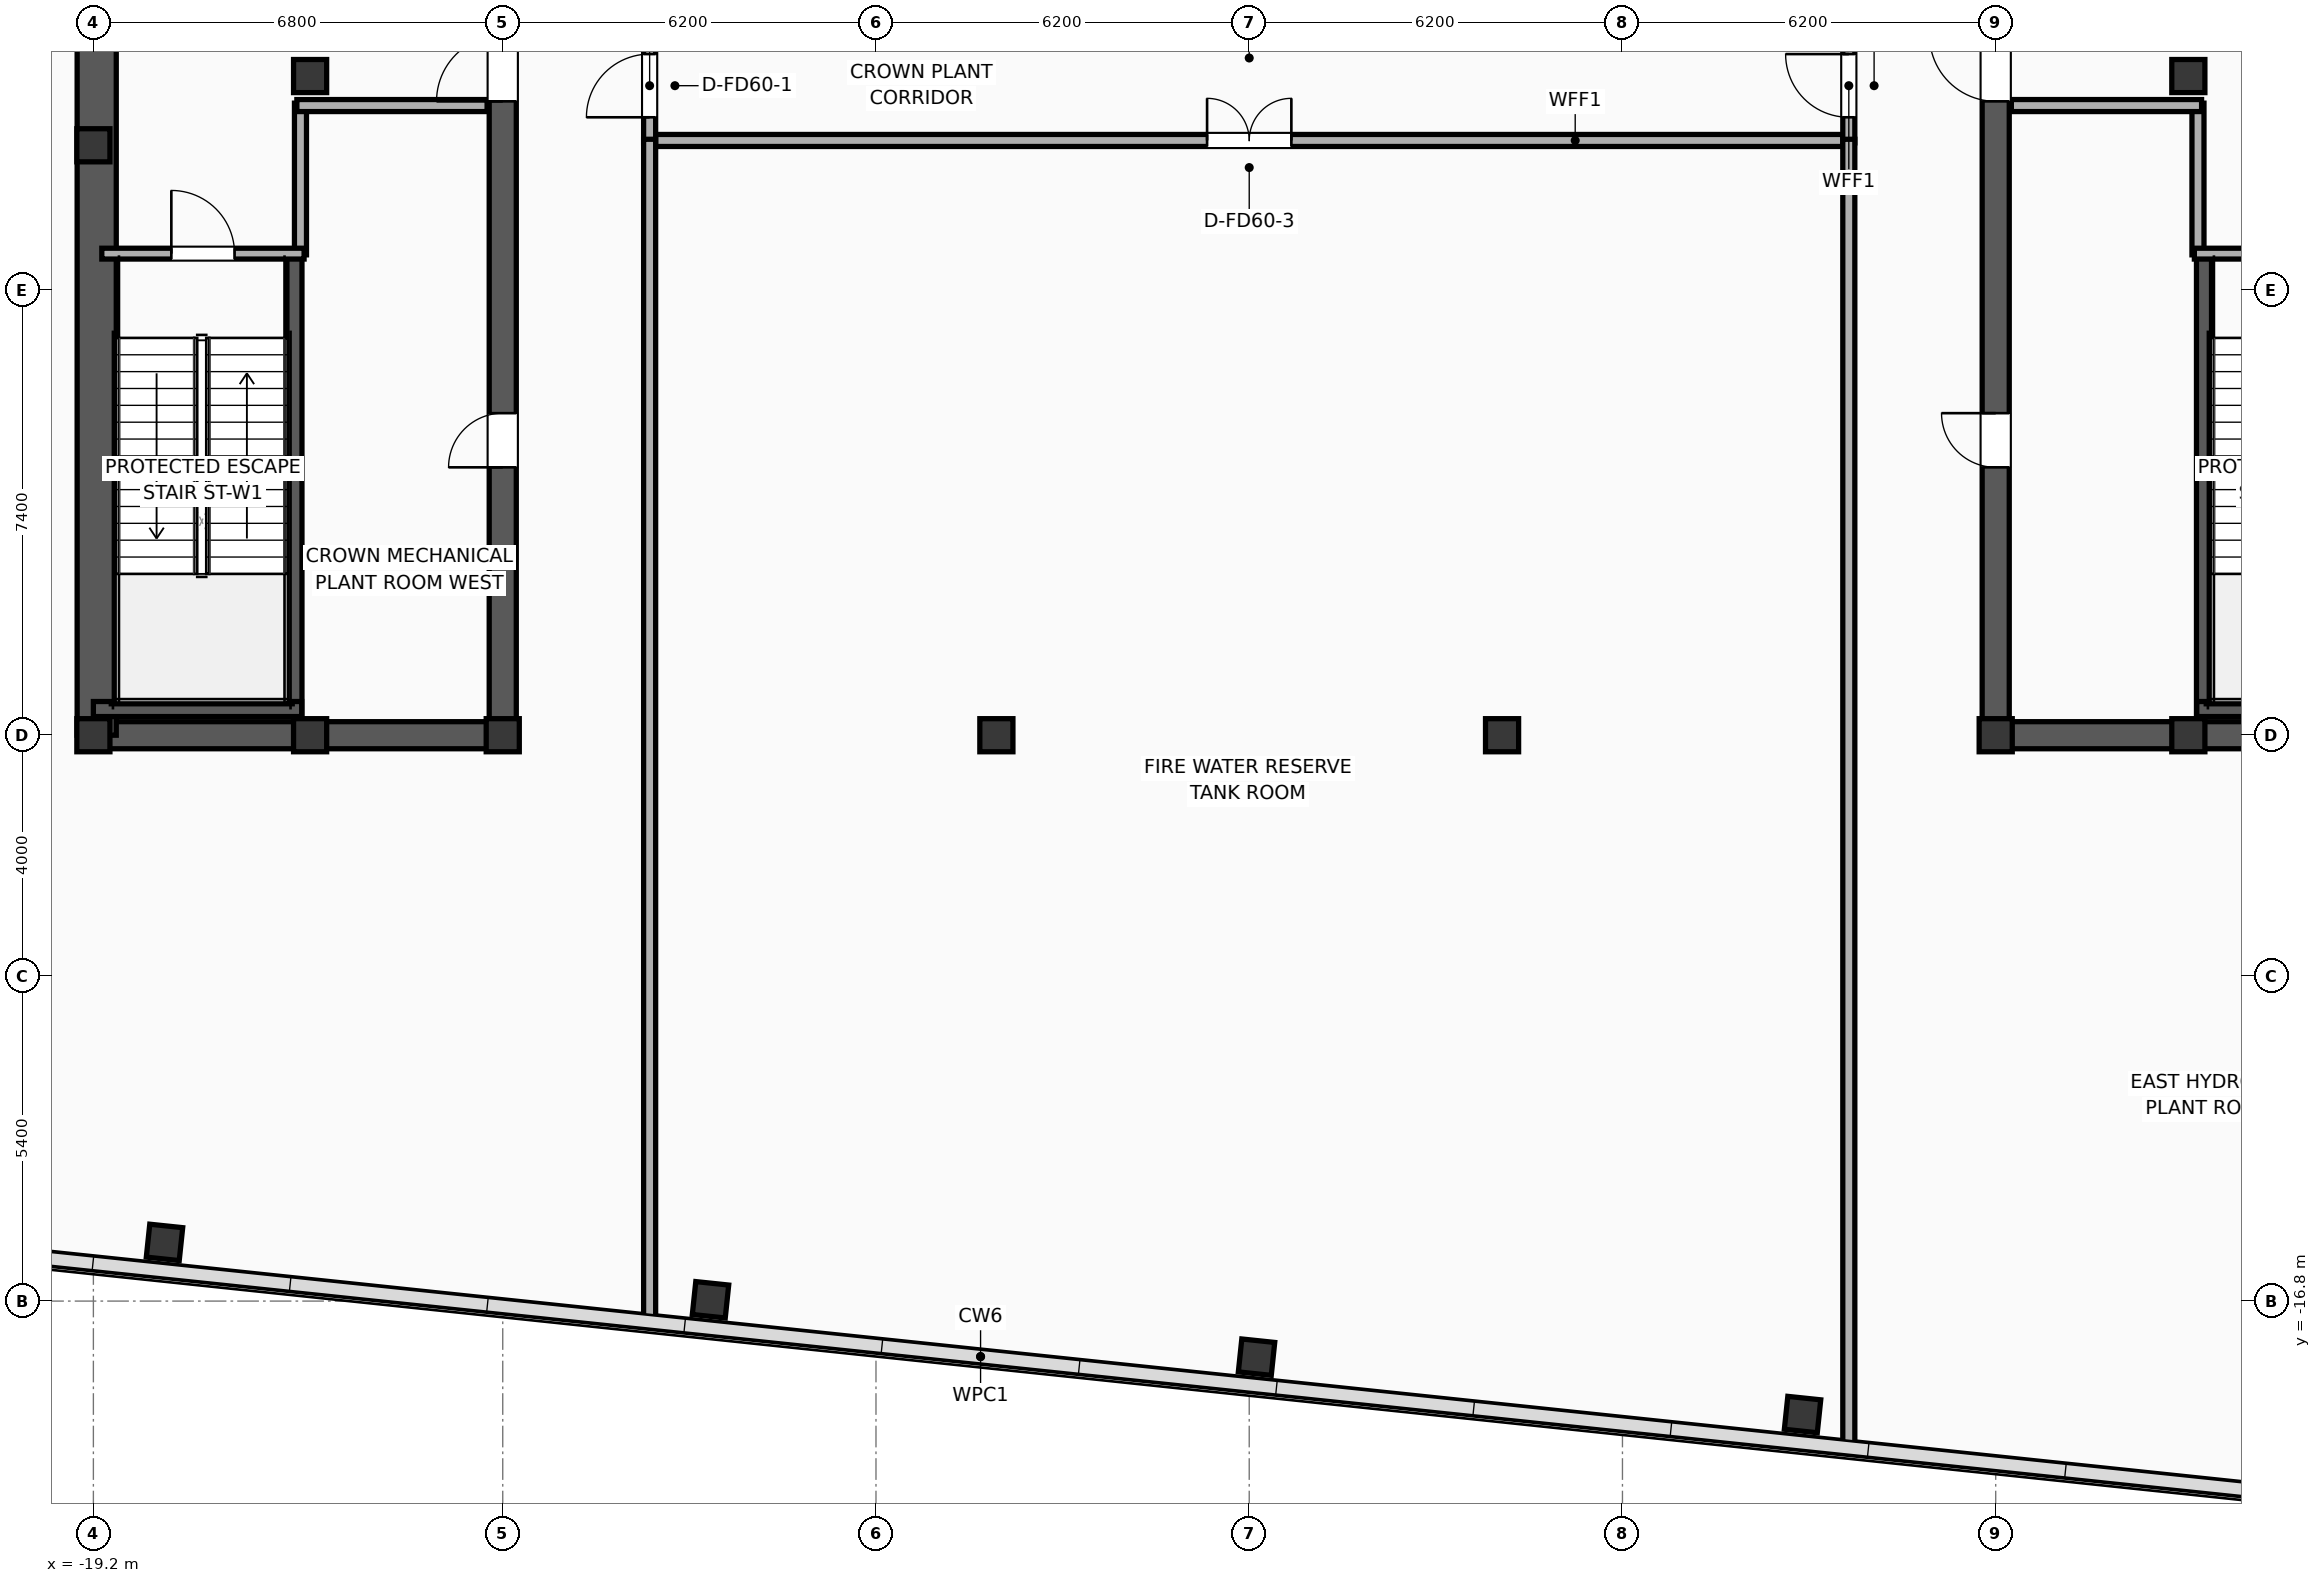
"""IFC4 building model, lengths in metres.
Left out: names, types, materials, properties, quantities, classifications, styles, units other than length and angle.
Written with IfcOpenShell. Run it as: python <this file> out.ifc"""

import sys

from ifc_helpers import new_model, si_unit, direction, frame, frame_2d, origin, origin_2d, place, context, subcontext, project, spatial, rectangle, hollow_rectangle, extrude, element, fill, save


model = new_model("IFC4")
c1 = context("Model", 3, precision=1e-05, world=origin(), true_north=direction((0.0, 1.0)))
c2 = subcontext(c1, "Body", "Model", "MODEL_VIEW")
j1 = project(units=[si_unit("LENGTHUNIT", "METRE"), si_unit("PLANEANGLEUNIT", "RADIAN")], contexts=[c1])
p1 = place(None, origin())
s1 = spatial("IfcSite", under=j1, at=p1, CompositionType="ELEMENT")
p2 = place(p1, origin())
s2 = spatial("IfcBuilding", under=s1, at=p2, CompositionType="ELEMENT")
p3 = place(p2, frame((0.0, 0.0, 321.3)))
s3 = spatial("IfcBuildingStorey", under=s2, at=p3, CompositionType="ELEMENT", Elevation=321.3)
for number, where, z_axis, x_axis in (
    (1, (-19.2, -7.4, 0.0), (0.0, 0.0, 1.0), (1.0, 0.0, 0.0)),
    (2, (-19.2, 2.4, 0.0), (0.0, 0.0, 1.0), (1.0, 0.0, 0.0)),
    (3, (-15.6, -7.4, 0.0), (0.0, 0.0, 1.0), (1.0, 0.0, 0.0)),
    (4, (-12.4, -7.4, 0.0), (0.0, 0.0, 1.0), (1.0, 0.0, 0.0)),
    (5, (-15.6, 3.55, 0.0), (0.0, 0.0, 1.0), (1.0, 0.0, 0.0)),
    (6, (12.4, -7.4, 0.0), (0.0, 0.0, 1.0), (1.0, 0.0, 0.0)),
    (7, (15.6, 3.55, 0.0), (0.0, 0.0, 1.0), (1.0, 0.0, 0.0)),
    (8, (15.6, -7.4, 0.0), (0.0, 0.0, 1.0), (1.0, 0.0, 0.0)),
):
    element("IfcColumn", number, at=place(p3, frame(where, z_axis=z_axis, x_axis=x_axis)), inside=s3, PredefinedType="COLUMN", context=c2, shape_type="SweptSolid", body=[
        extrude(hollow_rectangle(XDim=0.55, YDim=0.55, WallThickness=0.022, at=origin_2d()), origin(), (0.0, 0.0, 1.0), 5.3),
    ])
p4 = place(p3, frame((-19.425, -7.4, 0.0), z_axis=(0.0, 0.0, 1.0), x_axis=(1.0, 0.0, 0.0)))
e9 = element("IfcWall", 9, at=p4, inside=s3, PredefinedType="SHEAR", context=c2, shape_type="SweptSolid", body=[
    extrude(rectangle(XDim=7.25, YDim=0.45, at=frame_2d((3.625, 0.0))), origin(), (0.0, 0.0, 1.0), 5.025),
])
p5 = place(p3, frame((-19.145, -7.4, 0.0), z_axis=(0.0, 0.0, 1.0), x_axis=(0.0, 1.0, 0.0)))
e10 = element("IfcWall", 10, at=p5, inside=s3, PredefinedType="SHEAR", context=c2, shape_type="SweptSolid", body=[
    extrude(rectangle(XDim=14.8, YDim=0.65, at=frame_2d((7.4, 0.0))), origin(), (0.0, 0.0, 1.0), 5.025),
])
p6 = place(p3, frame((-12.4, -7.4, 0.0), z_axis=(0.0, 0.0, 1.0), x_axis=(0.0, 1.0, 0.0)))
e11 = element("IfcWall", 11, at=p6, inside=s3, PredefinedType="SHEAR", context=c2, shape_type="SweptSolid", body=[
    extrude(rectangle(XDim=14.8, YDim=0.45, at=frame_2d((7.4, 0.0))), origin(), (0.0, 0.0, 1.0), 5.025),
])
p7 = place(p6, frame((10.53, 0.0, 0.0)))
e12 = element("IfcOpeningElement", 12, at=p7, cuts=e11, PredefinedType="OPENING", context=c2, shape_type="SweptSolid", body=[
    extrude(rectangle(XDim=1.1, YDim=2.05, at=frame_2d((0.55, 1.025))), frame((0.0, 0.235, 0.0), z_axis=(0.0, -1.0, 0.0), x_axis=(1.0, 0.0, 0.0)), (0.0, 0.0, 1.0), 0.47),
])
p8 = place(p6, frame((4.45, 0.0, 0.0)))
e13 = element("IfcOpeningElement", 13, at=p8, cuts=e11, PredefinedType="OPENING", context=c2, shape_type="SweptSolid", body=[
    extrude(rectangle(XDim=0.9, YDim=2.05, at=frame_2d((0.45, 1.025))), frame((0.0, 0.235, 0.0), z_axis=(0.0, -1.0, 0.0), x_axis=(1.0, 0.0, 0.0)), (0.0, 0.0, 1.0), 0.47),
])
p9 = place(p3, frame((-15.86, -7.085, 0.0), z_axis=(0.0, 0.0, 1.0), x_axis=(0.0, 1.0, 0.0)))
e14 = element("IfcWall", 14, at=p9, inside=s3, PredefinedType="SOLIDWALL", context=c2, shape_type="SweptSolid", body=[
    extrude(rectangle(XDim=7.685, YDim=0.25, at=frame_2d((3.843, 0.0))), origin(), (0.0, 0.0, 1.0), 5.025),
])
p10 = place(p3, frame((-19.2, -6.965, 0.0), z_axis=(0.0, 0.0, 1.0), x_axis=(1.0, 0.0, 0.0)))
e15 = element("IfcWall", 15, at=p10, inside=s3, PredefinedType="SOLIDWALL", context=c2, shape_type="SweptSolid", body=[
    extrude(rectangle(XDim=3.46, YDim=0.25, at=frame_2d((1.73, 0.0))), origin(), (0.0, 0.0, 1.0), 5.025),
])
p11 = place(p3, frame((12.175, -7.4, 0.0), z_axis=(0.0, 0.0, 1.0), x_axis=(1.0, 0.0, 0.0)))
e16 = element("IfcWall", 16, at=p11, inside=s3, PredefinedType="SHEAR", context=c2, shape_type="SweptSolid", body=[
    extrude(rectangle(XDim=7.25, YDim=0.45, at=frame_2d((3.625, 0.0))), origin(), (0.0, 0.0, 1.0), 5.025),
])
p12 = place(p3, frame((12.4, -7.4, 0.0), z_axis=(0.0, 0.0, 1.0), x_axis=(0.0, 1.0, 0.0)))
e17 = element("IfcWall", 17, at=p12, inside=s3, PredefinedType="SHEAR", context=c2, shape_type="SweptSolid", body=[
    extrude(rectangle(XDim=14.8, YDim=0.45, at=frame_2d((7.4, 0.0))), origin(), (0.0, 0.0, 1.0), 5.025),
])
p13 = place(p12, frame((10.53, 0.0, 0.0)))
e18 = element("IfcOpeningElement", 18, at=p13, cuts=e17, PredefinedType="OPENING", context=c2, shape_type="SweptSolid", body=[
    extrude(rectangle(XDim=1.1, YDim=2.05, at=frame_2d((0.55, 1.025))), frame((0.0, 0.235, 0.0), z_axis=(0.0, -1.0, 0.0), x_axis=(1.0, 0.0, 0.0)), (0.0, 0.0, 1.0), 0.47),
])
p14 = place(p12, frame((4.45, 0.0, 0.0)))
e19 = element("IfcOpeningElement", 19, at=p14, cuts=e17, PredefinedType="OPENING", context=c2, shape_type="SweptSolid", body=[
    extrude(rectangle(XDim=0.9, YDim=2.05, at=frame_2d((0.45, 1.025))), frame((0.0, 0.235, 0.0), z_axis=(0.0, -1.0, 0.0), x_axis=(1.0, 0.0, 0.0)), (0.0, 0.0, 1.0), 0.47),
])
p15 = place(p3, frame((15.86, -7.085, 0.0), z_axis=(0.0, 0.0, 1.0), x_axis=(0.0, 1.0, 0.0)))
e20 = element("IfcWall", 20, at=p15, inside=s3, PredefinedType="SOLIDWALL", context=c2, shape_type="SweptSolid", body=[
    extrude(rectangle(XDim=7.685, YDim=0.25, at=frame_2d((3.843, 0.0))), origin(), (0.0, 0.0, 1.0), 5.025),
])
p16 = place(p3, frame((15.74, -6.965, 0.0), z_axis=(0.0, 0.0, 1.0), x_axis=(1.0, 0.0, 0.0)))
e21 = element("IfcWall", 21, at=p16, inside=s3, PredefinedType="SOLIDWALL", context=c2, shape_type="SweptSolid", body=[
    extrude(rectangle(XDim=3.46, YDim=0.25, at=frame_2d((1.73, 0.0))), origin(), (0.0, 0.0, 1.0), 5.025),
])
for number, where, z_axis, x_axis in (
    (22, (-4.2, -7.4, 0.0), (0.0, 0.0, 1.0), (1.0, 0.0, 0.0)),
    (23, (4.2, -7.4, 0.0), (0.0, 0.0, 1.0), (1.0, 0.0, 0.0)),
    (24, (-18.019, -15.825, 0.0), (0.0, 0.0, 1.0), (0.995, -0.105, 0.0)),
    (25, (-8.948, -16.778, 0.0), (0.0, 0.0, 1.0), (0.995, -0.105, 0.0)),
    (26, (0.121, -17.732, 0.0), (0.0, 0.0, 1.0), (0.995, -0.105, 0.0)),
    (27, (9.191, -18.685, 0.0), (0.0, 0.0, 1.0), (0.995, -0.105, 0.0)),
):
    element("IfcColumn", number, at=place(p3, frame(where, z_axis=z_axis, x_axis=x_axis)), inside=s3, PredefinedType="COLUMN", context=c2, shape_type="SweptSolid", body=[
        extrude(hollow_rectangle(XDim=0.55, YDim=0.55, WallThickness=0.022, at=origin_2d()), origin(), (0.0, 0.0, 1.0), 5.3),
    ])
p17 = place(p3, frame((18.195, -20.104, 0.0), z_axis=(0.0, 0.0, 1.0), x_axis=(-0.994522116558, 0.104526358762, 0.0)))
e28 = element("IfcWall", 28, at=p17, inside=s3, PredefinedType="PARAPET", context=c2, shape_type="SweptSolid", body=[
    extrude(rectangle(XDim=45.564, YDim=0.22, at=frame_2d((22.782, 0.0))), origin(), (0.0, 0.0, 1.0), 1.2),
])
p18 = place(p3, frame((-15.76, 0.58, 0.0), z_axis=(0.0, 0.0, 1.0), x_axis=(0.0, 1.0, 0.0)))
e29 = element("IfcWall", 29, at=p18, inside=s3, PredefinedType="PARTITIONING", context=c2, shape_type="SweptSolid", body=[
    extrude(rectangle(XDim=2.52, YDim=0.2, at=frame_2d((1.26, 0.0))), origin(), (0.0, 0.0, 1.0), 5.025),
])
p19 = place(p3, frame((-15.82, 3.06, 0.0), z_axis=(0.0, 0.0, 1.0), x_axis=(1.0, 0.0, 0.0)))
e30 = element("IfcWall", 30, at=p19, inside=s3, PredefinedType="PARTITIONING", context=c2, shape_type="SweptSolid", body=[
    extrude(rectangle(XDim=3.16, YDim=0.2, at=frame_2d((1.58, 0.0))), origin(), (0.0, 0.0, 1.0), 5.025),
])
p20 = place(p3, frame((-19.06, 0.6, 0.0), z_axis=(0.0, 0.0, 1.0), x_axis=(1.0, 0.0, 0.0)))
e31 = element("IfcWall", 31, at=p20, inside=s3, PredefinedType="PARTITIONING", context=c2, shape_type="SweptSolid", body=[
    extrude(rectangle(XDim=3.36, YDim=0.18, at=frame_2d((1.68, 0.0))), origin(), (0.0, 0.0, 1.0), 5.025),
])
p21 = place(p20, frame((1.155, 0.0, 0.0)))
e32 = element("IfcOpeningElement", 32, at=p21, cuts=e31, PredefinedType="OPENING", context=c2, shape_type="SweptSolid", body=[
    extrude(rectangle(XDim=1.05, YDim=2.05, at=frame_2d((0.525, 1.025))), frame((0.0, 0.1, 0.0), z_axis=(0.0, -1.0, 0.0), x_axis=(1.0, 0.0, 0.0)), (0.0, 0.0, 1.0), 0.2),
])
p22 = place(p3, frame((15.76, 0.58, 0.0), z_axis=(0.0, 0.0, 1.0), x_axis=(0.0, 1.0, 0.0)))
e33 = element("IfcWall", 33, at=p22, inside=s3, PredefinedType="PARTITIONING", context=c2, shape_type="SweptSolid", body=[
    extrude(rectangle(XDim=2.52, YDim=0.2, at=frame_2d((1.26, 0.0))), origin(), (0.0, 0.0, 1.0), 5.025),
])
p23 = place(p3, frame((12.66, 3.06, 0.0), z_axis=(0.0, 0.0, 1.0), x_axis=(1.0, 0.0, 0.0)))
e34 = element("IfcWall", 34, at=p23, inside=s3, PredefinedType="PARTITIONING", context=c2, shape_type="SweptSolid", body=[
    extrude(rectangle(XDim=3.16, YDim=0.2, at=frame_2d((1.58, 0.0))), origin(), (0.0, 0.0, 1.0), 5.025),
])
p24 = place(p3, frame((15.7, 0.6, 0.0), z_axis=(0.0, 0.0, 1.0), x_axis=(1.0, 0.0, 0.0)))
e35 = element("IfcWall", 35, at=p24, inside=s3, PredefinedType="PARTITIONING", context=c2, shape_type="SweptSolid", body=[
    extrude(rectangle(XDim=3.36, YDim=0.18, at=frame_2d((1.68, 0.0))), origin(), (0.0, 0.0, 1.0), 5.025),
])
p25 = place(p24, frame((1.155, 0.0, 0.0)))
e36 = element("IfcOpeningElement", 36, at=p25, cuts=e35, PredefinedType="OPENING", context=c2, shape_type="SweptSolid", body=[
    extrude(rectangle(XDim=1.05, YDim=2.05, at=frame_2d((0.525, 1.025))), frame((0.0, 0.1, 0.0), z_axis=(0.0, -1.0, 0.0), x_axis=(1.0, 0.0, 0.0)), (0.0, 0.0, 1.0), 0.2),
])
p26 = place(p3, frame((-9.98, 2.48, 0.0), z_axis=(0.0, 0.0, 1.0), x_axis=(1.0, 0.0, 0.0)))
e37 = element("IfcWall", 37, at=p26, inside=s3, PredefinedType="PARTITIONING", context=c2, shape_type="SweptSolid", body=[
    extrude(rectangle(XDim=19.96, YDim=0.2, at=frame_2d((9.98, 0.0))), origin(), (0.0, 0.0, 1.0), 4.595),
])
p27 = place(p26, frame((9.28, 0.0, 0.0)))
e38 = element("IfcOpeningElement", 38, at=p27, cuts=e37, PredefinedType="OPENING", context=c2, shape_type="SweptSolid", body=[
    extrude(rectangle(XDim=1.4, YDim=2.05, at=frame_2d((0.7, 1.025))), frame((0.0, 0.11, 0.0), z_axis=(0.0, -1.0, 0.0), x_axis=(1.0, 0.0, 0.0)), (0.0, 0.0, 1.0), 0.22),
])
p28 = place(p3, frame((-9.96, 2.44, 0.0), z_axis=(0.0, 0.0, 1.0), x_axis=(0.0, 1.0, 0.0)))
e39 = element("IfcWall", 39, at=p28, inside=s3, PredefinedType="PARTITIONING", context=c2, shape_type="SweptSolid", body=[
    extrude(rectangle(XDim=1.9, YDim=0.2, at=frame_2d((0.95, 0.0))), origin(), (0.0, 0.0, 1.0), 5.025),
])
p29 = place(p28, frame((0.425, 0.0, 0.0)))
e40 = element("IfcOpeningElement", 40, at=p29, cuts=e39, PredefinedType="OPENING", context=c2, shape_type="SweptSolid", body=[
    extrude(rectangle(XDim=1.05, YDim=2.05, at=frame_2d((0.525, 1.025))), frame((0.0, 0.11, 0.0), z_axis=(0.0, -1.0, 0.0), x_axis=(1.0, 0.0, 0.0)), (0.0, 0.0, 1.0), 0.22),
])
p30 = place(p3, frame((9.96, 2.44, 0.0), z_axis=(0.0, 0.0, 1.0), x_axis=(0.0, 1.0, 0.0)))
e41 = element("IfcWall", 41, at=p30, inside=s3, PredefinedType="PARTITIONING", context=c2, shape_type="SweptSolid", body=[
    extrude(rectangle(XDim=1.9, YDim=0.2, at=frame_2d((0.95, 0.0))), origin(), (0.0, 0.0, 1.0), 5.025),
])
p31 = place(p30, frame((0.425, 0.0, 0.0)))
e42 = element("IfcOpeningElement", 42, at=p31, cuts=e41, PredefinedType="OPENING", context=c2, shape_type="SweptSolid", body=[
    extrude(rectangle(XDim=1.05, YDim=2.05, at=frame_2d((0.525, 1.025))), frame((0.0, 0.11, 0.0), z_axis=(0.0, -1.0, 0.0), x_axis=(1.0, 0.0, 0.0)), (0.0, 0.0, 1.0), 0.22),
])
p32 = place(p3, frame((-9.96, -17.125, 0.0), z_axis=(0.0, 0.0, 1.0), x_axis=(0.0, 1.0, 0.0)))
e43 = element("IfcWall", 43, at=p32, inside=s3, PredefinedType="PARTITIONING", context=c2, shape_type="SweptSolid", body=[
    extrude(rectangle(XDim=19.625, YDim=0.2, at=frame_2d((9.812, 0.0))), origin(), (0.0, 0.0, 1.0), 4.465),
])
p33 = place(p3, frame((9.96, -19.218, 0.0), z_axis=(0.0, 0.0, 1.0), x_axis=(0.0, 1.0, 0.0)))
e44 = element("IfcWall", 44, at=p33, inside=s3, PredefinedType="PARTITIONING", context=c2, shape_type="SweptSolid", body=[
    extrude(rectangle(XDim=21.718, YDim=0.2, at=frame_2d((10.859, 0.0))), origin(), (0.0, 0.0, 1.0), 4.465),
])
p34 = place(p21, origin())
e45 = element("IfcDoor", 45, at=p34, inside=s3, OperationType="SINGLE_SWING_LEFT", PredefinedType="DOOR", context=c2, shape_type="SweptSolid", body=[
    extrude(rectangle(XDim=1.05, YDim=2.05, at=frame_2d((0.525, 1.025))), frame((0.0, 0.025, 0.0), z_axis=(0.0, -1.0, 0.0), x_axis=(1.0, 0.0, 0.0)), (0.0, 0.0, 1.0), 0.05),
])
fill(e32, e45)
p35 = place(p27, origin())
e46 = element("IfcDoor", 46, at=p35, inside=s3, OperationType="DOUBLE_DOOR_SINGLE_SWING", PredefinedType="DOOR", context=c2, shape_type="SweptSolid", body=[
    extrude(rectangle(XDim=1.4, YDim=2.05, at=frame_2d((0.7, 1.025))), frame((0.0, 0.025, 0.0), z_axis=(0.0, -1.0, 0.0), x_axis=(1.0, 0.0, 0.0)), (0.0, 0.0, 1.0), 0.05),
])
fill(e38, e46)
p36 = place(p29, origin())
e47 = element("IfcDoor", 47, at=p36, inside=s3, OperationType="SINGLE_SWING_LEFT", PredefinedType="DOOR", context=c2, shape_type="SweptSolid", body=[
    extrude(rectangle(XDim=1.05, YDim=2.05, at=frame_2d((0.525, 1.025))), frame((0.0, 0.025, 0.0), z_axis=(0.0, -1.0, 0.0), x_axis=(1.0, 0.0, 0.0)), (0.0, 0.0, 1.0), 0.05),
])
fill(e40, e47)
p37 = place(p31, origin())
e48 = element("IfcDoor", 48, at=p37, inside=s3, OperationType="SINGLE_SWING_RIGHT", PredefinedType="DOOR", context=c2, shape_type="SweptSolid", body=[
    extrude(rectangle(XDim=1.05, YDim=2.05, at=frame_2d((0.525, 1.025))), frame((0.0, 0.025, 0.0), z_axis=(0.0, -1.0, 0.0), x_axis=(1.0, 0.0, 0.0)), (0.0, 0.0, 1.0), 0.05),
])
fill(e42, e48)
p38 = place(p7, origin())
e49 = element("IfcDoor", 49, at=p38, inside=s3, OperationType="SINGLE_SWING_LEFT", PredefinedType="DOOR", context=c2, shape_type="SweptSolid", body=[
    extrude(rectangle(XDim=1.1, YDim=2.05, at=frame_2d((0.55, 1.025))), frame((0.0, 0.025, 0.0), z_axis=(0.0, -1.0, 0.0), x_axis=(1.0, 0.0, 0.0)), (0.0, 0.0, 1.0), 0.05),
])
fill(e12, e49)
p39 = place(p8, origin())
e50 = element("IfcDoor", 50, at=p39, inside=s3, OperationType="SINGLE_SWING_LEFT", PredefinedType="DOOR", context=c2, shape_type="SweptSolid", body=[
    extrude(rectangle(XDim=0.9, YDim=2.05, at=frame_2d((0.45, 1.025))), frame((0.0, 0.025, 0.0), z_axis=(0.0, -1.0, 0.0), x_axis=(1.0, 0.0, 0.0)), (0.0, 0.0, 1.0), 0.05),
])
fill(e13, e50)
p40 = place(p13, origin())
e51 = element("IfcDoor", 51, at=p40, inside=s3, OperationType="SINGLE_SWING_RIGHT", PredefinedType="DOOR", context=c2, shape_type="SweptSolid", body=[
    extrude(rectangle(XDim=1.1, YDim=2.05, at=frame_2d((0.55, 1.025))), frame((0.0, 0.025, 0.0), z_axis=(0.0, -1.0, 0.0), x_axis=(1.0, 0.0, 0.0)), (0.0, 0.0, 1.0), 0.05),
])
fill(e18, e51)
p41 = place(p14, origin())
e52 = element("IfcDoor", 52, at=p41, inside=s3, OperationType="SINGLE_SWING_RIGHT", PredefinedType="DOOR", context=c2, shape_type="SweptSolid", body=[
    extrude(rectangle(XDim=0.9, YDim=2.05, at=frame_2d((0.45, 1.025))), frame((0.0, 0.025, 0.0), z_axis=(0.0, -1.0, 0.0), x_axis=(1.0, 0.0, 0.0)), (0.0, 0.0, 1.0), 0.05),
])
fill(e19, e52)
save(model, sys.argv[1])
